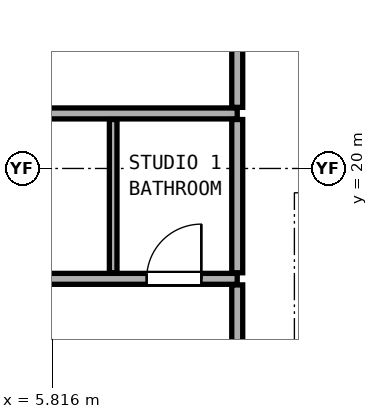
"""IFC4 building model, lengths in metres.
Left out: names, types, materials, properties, quantities, classifications, styles, units other than length and angle.
Written with IfcOpenShell. Run it as: python <this file> out.ifc"""

import sys

from ifc_helpers import new_model, si_unit, direction, frame, frame_2d, origin, place, context, subcontext, project, spatial, rectangle, extrude, element, fill, save


model = new_model("IFC4")
c1 = context("Model", 3, precision=1e-05, world=origin(), true_north=direction((0.0, 1.0)))
c2 = subcontext(c1, "Body", "Model", "MODEL_VIEW")
j1 = project(units=[si_unit("LENGTHUNIT", "METRE"), si_unit("PLANEANGLEUNIT", "RADIAN")], contexts=[c1])
p1 = place(None, origin())
s1 = spatial("IfcSite", under=j1, at=p1, CompositionType="ELEMENT")
p2 = place(p1, origin())
s2 = spatial("IfcBuilding", under=s1, at=p2, CompositionType="ELEMENT")
p3 = place(p2, frame((0.0, 0.0, 45.5)))
s3 = spatial("IfcBuildingStorey", under=s2, at=p3, CompositionType="ELEMENT", Elevation=45.5)
p4 = place(p3, frame((-2.44, 18.185, 0.0), z_axis=(0.0, 0.0, 1.0), x_axis=(1.0, 0.0, 0.0)))
e1 = element("IfcWall", 1, at=p4, inside=s3, PredefinedType="PARTITIONING", context=c2, shape_type="SweptSolid", body=[
    extrude(rectangle(XDim=11.3, YDim=0.18, at=frame_2d((5.65, 0.0))), origin(), (0.0, 0.0, 1.0), 2.436),
])
p5 = place(p4, frame((2.825, 0.0, 0.0)))
e2 = element("IfcOpeningElement", 2, at=p5, cuts=e1, PredefinedType="OPENING", context=c2, shape_type="SweptSolid", body=[
    extrude(rectangle(XDim=0.95, YDim=2.15, at=frame_2d((0.475, 1.075))), frame((0.0, 0.1, 0.0), z_axis=(0.0, -1.0, 0.0), x_axis=(1.0, 0.0, 0.0)), (0.0, 0.0, 1.0), 0.2),
])
p6 = place(p4, frame((9.81, 0.0, 0.0)))
e3 = element("IfcOpeningElement", 3, at=p6, cuts=e1, PredefinedType="OPENING", context=c2, shape_type="SweptSolid", body=[
    extrude(rectangle(XDim=0.9, YDim=2.1, at=frame_2d((0.45, 1.05))), frame((0.0, 0.1, 0.0), z_axis=(0.0, -1.0, 0.0), x_axis=(1.0, 0.0, 0.0)), (0.0, 0.0, 1.0), 0.2),
])
p7 = place(p3, frame((-2.44, 20.905, 0.0), z_axis=(0.0, 0.0, 1.0), x_axis=(1.0, 0.0, 0.0)))
e4 = element("IfcWall", 4, at=p7, inside=s3, PredefinedType="PARTITIONING", context=c2, shape_type="SweptSolid", body=[
    extrude(rectangle(XDim=11.3, YDim=0.18, at=frame_2d((5.65, 0.0))), origin(), (0.0, 0.0, 1.0), 2.125),
])
p8 = place(p3, frame((6.82, 18.285, 0.0), z_axis=(0.0, 0.0, 1.0), x_axis=(0.0, 1.0, 0.0)))
e5 = element("IfcWall", 5, at=p8, inside=s3, PredefinedType="PARTITIONING", context=c2, shape_type="SweptSolid", body=[
    extrude(rectangle(XDim=2.52, YDim=0.125, at=frame_2d((1.26, 0.0))), origin(), (0.0, 0.0, 1.0), 2.452),
])
p9 = place(p3, frame((8.86, 13.814, 0.0), z_axis=(0.0, 0.0, 1.0), x_axis=(0.0, 1.0, 0.0)))
e6 = element("IfcWall", 6, at=p9, inside=s3, PredefinedType="PARTITIONING", context=c2, shape_type="SweptSolid", body=[
    extrude(rectangle(XDim=4.271, YDim=0.18, at=frame_2d((2.135, 0.0))), origin(), (0.0, 0.0, 1.0), 2.436),
])
p10 = place(p9, frame((0.26, 0.0, 0.0)))
e7 = element("IfcOpeningElement", 7, at=p10, cuts=e6, PredefinedType="OPENING", context=c2, shape_type="SweptSolid", body=[
    extrude(rectangle(XDim=1.05, YDim=2.2, at=frame_2d((0.525, 1.1))), frame((0.0, 0.1, 0.0), z_axis=(0.0, -1.0, 0.0), x_axis=(1.0, 0.0, 0.0)), (0.0, 0.0, 1.0), 0.2),
])
p11 = place(p3, frame((8.86, 18.285, 0.0), z_axis=(0.0, 0.0, 1.0), x_axis=(0.0, 1.0, 0.0)))
e8 = element("IfcWall", 8, at=p11, inside=s3, PredefinedType="PARTITIONING", context=c2, shape_type="SweptSolid", body=[
    extrude(rectangle(XDim=2.52, YDim=0.18, at=frame_2d((1.26, 0.0))), origin(), (0.0, 0.0, 1.0), 2.452),
])
p12 = place(p3, frame((8.86, 21.005, 0.0), z_axis=(0.0, 0.0, 1.0), x_axis=(0.0, 1.0, 0.0)))
e9 = element("IfcWall", 9, at=p12, inside=s3, PredefinedType="PARTITIONING", context=c2, shape_type="SweptSolid", body=[
    extrude(rectangle(XDim=4.175, YDim=0.18, at=frame_2d((2.087, 0.0))), origin(), (0.0, 0.0, 1.0), 2.279),
])
p13 = place(p12, frame((1.562, 0.0, 0.0)))
e10 = element("IfcOpeningElement", 10, at=p13, cuts=e9, PredefinedType="OPENING", context=c2, shape_type="SweptSolid", body=[
    extrude(rectangle(XDim=1.05, YDim=2.2, at=frame_2d((0.525, 1.1))), frame((0.0, 0.1, 0.0), z_axis=(0.0, -1.0, 0.0), x_axis=(1.0, 0.0, 0.0)), (0.0, 0.0, 1.0), 0.2),
])
p14 = place(p6, origin())
e11 = element("IfcDoor", 11, at=p14, inside=s3, OperationType="SINGLE_SWING_RIGHT", PredefinedType="DOOR", context=c2, shape_type="SweptSolid", body=[
    extrude(rectangle(XDim=0.9, YDim=2.1, at=frame_2d((0.45, 1.05))), frame((0.0, 0.025, 0.0), z_axis=(0.0, -1.0, 0.0), x_axis=(1.0, 0.0, 0.0)), (0.0, 0.0, 1.0), 0.05),
])
fill(e3, e11)
save(model, sys.argv[1])
